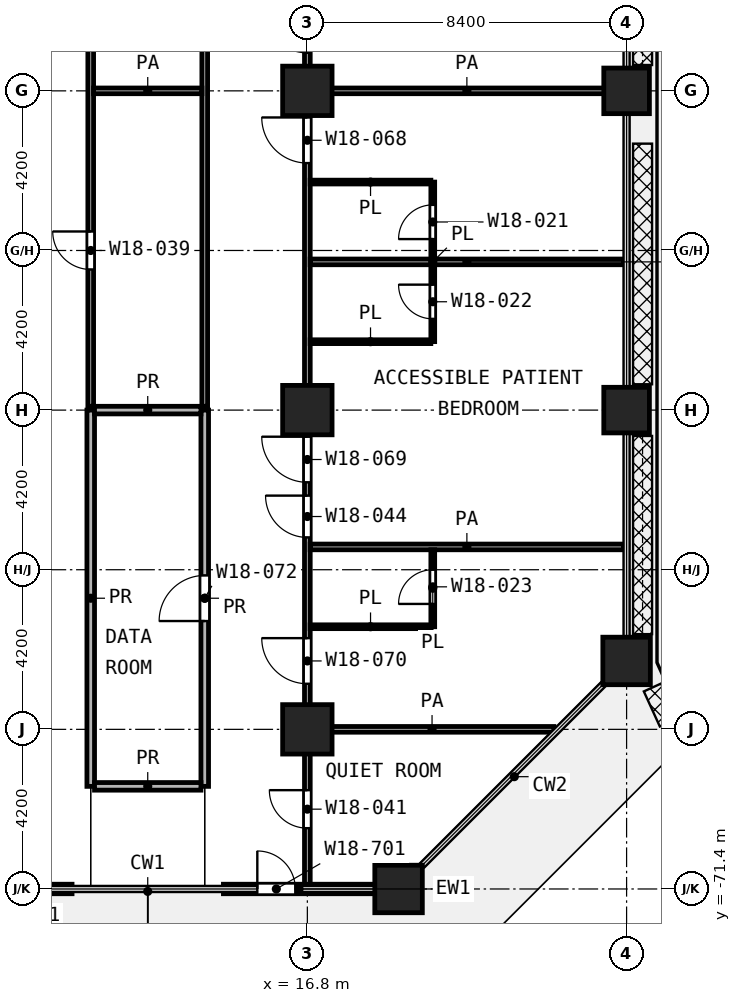
"""IFC4 building model, lengths in metres.
Left out: names, types, materials, properties, quantities, classifications, styles, units other than length and angle.
Written with IfcOpenShell. Run it as: python <this file> out.ifc"""

import sys

from ifc_helpers import new_model, si_unit, direction, frame, frame_2d, origin, origin_2d, place, context, subcontext, project, spatial, rectangle, extrude, element, fill, save


model = new_model("IFC4")
c1 = context("Model", 3, precision=1e-05, world=origin(), true_north=direction((0.0, 1.0)))
c2 = subcontext(c1, "Body", "Model", "MODEL_VIEW")
j1 = project(units=[si_unit("LENGTHUNIT", "METRE"), si_unit("PLANEANGLEUNIT", "RADIAN")], contexts=[c1])
p1 = place(None, origin())
s1 = spatial("IfcSite", under=j1, at=p1, CompositionType="ELEMENT")
p2 = place(p1, origin())
s2 = spatial("IfcBuilding", under=s1, at=p2, CompositionType="ELEMENT")
p3 = place(p2, frame((0.0, 0.0, 81.2)))
s3 = spatial("IfcBuildingStorey", under=s2, at=p3, CompositionType="ELEMENT", Elevation=81.2)
p4 = place(p3, frame((16.8, -50.4, 0.0), z_axis=(0.0, 0.0, 1.0), x_axis=(1.0, 0.0, 0.0)))
e1 = element("IfcColumn", 1, at=p4, inside=s3, PredefinedType="COLUMN", context=c2, shape_type="SweptSolid", body=[
    extrude(rectangle(XDim=1.3, YDim=1.3, at=origin_2d()), origin(), (0.0, 0.0, 1.0), 4.2),
])
p5 = place(p3, frame((25.2, -50.4, 0.0), z_axis=(0.0, 0.0, 1.0), x_axis=(1.0, 0.0, 0.0)))
e2 = element("IfcColumn", 2, at=p5, inside=s3, PredefinedType="COLUMN", context=c2, shape_type="SweptSolid", body=[
    extrude(rectangle(XDim=1.2, YDim=1.2, at=origin_2d()), origin(), (0.0, 0.0, 1.0), 4.2),
])
p6 = place(p3, frame((16.8, -58.8, 0.0), z_axis=(0.0, 0.0, 1.0), x_axis=(1.0, 0.0, 0.0)))
e3 = element("IfcColumn", 3, at=p6, inside=s3, PredefinedType="COLUMN", context=c2, shape_type="SweptSolid", body=[
    extrude(rectangle(XDim=1.3, YDim=1.3, at=origin_2d()), origin(), (0.0, 0.0, 1.0), 4.2),
])
p7 = place(p3, frame((25.2, -58.8, 0.0), z_axis=(0.0, 0.0, 1.0), x_axis=(1.0, 0.0, 0.0)))
e4 = element("IfcColumn", 4, at=p7, inside=s3, PredefinedType="COLUMN", context=c2, shape_type="SweptSolid", body=[
    extrude(rectangle(XDim=1.2, YDim=1.2, at=origin_2d()), origin(), (0.0, 0.0, 1.0), 4.2),
])
p8 = place(p3, frame((25.2, -65.4, 0.0), z_axis=(0.0, 0.0, 1.0), x_axis=(1.0, 0.0, 0.0)))
e5 = element("IfcColumn", 5, at=p8, inside=s3, PredefinedType="COLUMN", context=c2, shape_type="SweptSolid", body=[
    extrude(rectangle(XDim=1.25, YDim=1.25, at=origin_2d()), origin(), (0.0, 0.0, 1.0), 4.2),
])
p9 = place(p3, frame((16.8, -67.2, 0.0), z_axis=(0.0, 0.0, 1.0), x_axis=(1.0, 0.0, 0.0)))
e6 = element("IfcColumn", 6, at=p9, inside=s3, PredefinedType="COLUMN", context=c2, shape_type="SweptSolid", body=[
    extrude(rectangle(XDim=1.3, YDim=1.3, at=origin_2d()), origin(), (0.0, 0.0, 1.0), 4.2),
])
p10 = place(p3, frame((19.2, -71.4, 0.0), z_axis=(0.0, 0.0, 1.0), x_axis=(1.0, 0.0, 0.0)))
e7 = element("IfcColumn", 7, at=p10, inside=s3, PredefinedType="COLUMN", context=c2, shape_type="SweptSolid", body=[
    extrude(rectangle(XDim=1.25, YDim=1.25, at=origin_2d()), origin(), (0.0, 0.0, 1.0), 4.2),
])
p11 = place(p3, frame((6.625, -71.4, 0.0), z_axis=(0.0, 0.0, 1.0), x_axis=(1.0, 0.0, 0.0)))
e8 = element("IfcWall", 8, at=p11, inside=s3, PredefinedType="SOLIDWALL", context=c2, shape_type="SweptSolid", body=[
    extrude(rectangle(XDim=3.983, YDim=0.25, at=frame_2d((1.992, 0.0))), origin(), (0.0, 0.0, 1.0), 3.78),
])
p12 = place(p11, frame((2.092, 0.0, 0.0)))
e9 = element("IfcOpeningElement", 9, at=p12, cuts=e8, PredefinedType="OPENING", context=c2, shape_type="SweptSolid", body=[
    extrude(rectangle(XDim=1.0, YDim=2.1, at=frame_2d((0.5, 1.05))), frame((0.0, 0.135, 0.0), z_axis=(0.0, -1.0, 0.0), x_axis=(1.0, 0.0, 0.0)), (0.0, 0.0, 1.0), 0.27),
])
p13 = place(p3, frame((14.592, -71.4, 0.0), z_axis=(0.0, 0.0, 1.0), x_axis=(1.0, 0.0, 0.0)))
e10 = element("IfcWall", 10, at=p13, inside=s3, PredefinedType="SOLIDWALL", context=c2, shape_type="SweptSolid", body=[
    extrude(rectangle(XDim=3.983, YDim=0.25, at=frame_2d((1.992, 0.0))), origin(), (0.0, 0.0, 1.0), 3.78),
])
p14 = place(p13, frame((0.892, 0.0, 0.0)))
e11 = element("IfcOpeningElement", 11, at=p14, cuts=e10, PredefinedType="OPENING", context=c2, shape_type="SweptSolid", body=[
    extrude(rectangle(XDim=1.0, YDim=2.1, at=frame_2d((0.5, 1.05))), frame((0.0, 0.135, 0.0), z_axis=(0.0, -1.0, 0.0), x_axis=(1.0, 0.0, 0.0)), (0.0, 0.0, 1.0), 0.27),
])
p15 = place(p3, frame((16.875, -64.5, 0.0), z_axis=(0.0, 0.0, 1.0), x_axis=(1.0, 0.0, 0.0)))
e12 = element("IfcWall", 12, at=p15, inside=s3, PredefinedType="PARTITIONING", context=c2, shape_type="SweptSolid", body=[
    extrude(rectangle(XDim=3.175, YDim=0.1, at=frame_2d((1.587, 0.0))), origin(), (0.0, 0.0, 1.0), 3.9),
])
p16 = place(p3, frame((16.875, -57.0, 0.0), z_axis=(0.0, 0.0, 1.0), x_axis=(1.0, 0.0, 0.0)))
e13 = element("IfcWall", 13, at=p16, inside=s3, PredefinedType="PARTITIONING", context=c2, shape_type="SweptSolid", body=[
    extrude(rectangle(XDim=3.174, YDim=0.1, at=frame_2d((1.587, 0.0))), origin(), (0.0, 0.0, 1.0), 3.9),
])
p17 = place(p3, frame((16.875, -52.8, 0.0), z_axis=(0.0, 0.0, 1.0), x_axis=(1.0, 0.0, 0.0)))
e14 = element("IfcWall", 14, at=p17, inside=s3, PredefinedType="PARTITIONING", context=c2, shape_type="SweptSolid", body=[
    extrude(rectangle(XDim=3.175, YDim=0.1, at=frame_2d((1.587, 0.0))), origin(), (0.0, 0.0, 1.0), 3.9),
])
p18 = place(p3, frame((20.1, -64.5, 0.0), z_axis=(0.0, 0.0, 1.0), x_axis=(0.0, 1.0, 0.0)))
e15 = element("IfcWall", 15, at=p18, inside=s3, PredefinedType="PARTITIONING", context=c2, shape_type="SweptSolid", body=[
    extrude(rectangle(XDim=2.025, YDim=0.1, at=frame_2d((1.012, 0.0))), origin(), (0.0, 0.0, 1.0), 3.9),
])
p19 = place(p18, frame((0.6, 0.0, 0.0)))
e16 = element("IfcOpeningElement", 16, at=p19, cuts=e15, PredefinedType="OPENING", context=c2, shape_type="SweptSolid", body=[
    extrude(rectangle(XDim=0.9, YDim=2.1, at=frame_2d((0.45, 1.05))), frame((0.0, 0.06, 0.0), z_axis=(0.0, -1.0, 0.0), x_axis=(1.0, 0.0, 0.0)), (0.0, 0.0, 1.0), 0.12),
])
p20 = place(p3, frame((20.1, -56.998, 0.0), z_axis=(0.0, 0.0, 1.0), x_axis=(0.0, 1.0, 0.0)))
e17 = element("IfcWall", 17, at=p20, inside=s3, PredefinedType="PARTITIONING", context=c2, shape_type="SweptSolid", body=[
    extrude(rectangle(XDim=4.198, YDim=0.1, at=frame_2d((2.099, 0.0))), origin(), (0.0, 0.0, 1.0), 3.9),
])
p21 = place(p20, frame((2.698, 0.0, 0.0)))
e18 = element("IfcOpeningElement", 18, at=p21, cuts=e17, PredefinedType="OPENING", context=c2, shape_type="SweptSolid", body=[
    extrude(rectangle(XDim=0.9, YDim=2.1, at=frame_2d((0.45, 1.05))), frame((0.0, 0.06, 0.0), z_axis=(0.0, -1.0, 0.0), x_axis=(1.0, 0.0, 0.0)), (0.0, 0.0, 1.0), 0.12),
])
p22 = place(p20, frame((0.599, 0.0, 0.0)))
e19 = element("IfcOpeningElement", 19, at=p22, cuts=e17, PredefinedType="OPENING", context=c2, shape_type="SweptSolid", body=[
    extrude(rectangle(XDim=0.9, YDim=2.1, at=frame_2d((0.45, 1.05))), frame((0.0, 0.06, 0.0), z_axis=(0.0, -1.0, 0.0), x_axis=(1.0, 0.0, 0.0)), (0.0, 0.0, 1.0), 0.12),
])
p23 = place(p3, frame((16.875, -67.2, 0.0), z_axis=(0.0, 0.0, 1.0), x_axis=(1.0, 0.0, 0.0)))
e20 = element("IfcWall", 20, at=p23, inside=s3, PredefinedType="PARTITIONING", context=c2, shape_type="SweptSolid", body=[
    extrude(rectangle(XDim=6.412, YDim=0.15, at=frame_2d((3.206, 0.0))), origin(), (0.0, 0.0, 1.0), 3.9),
])
for number, where, z_axis, x_axis in (
    (21, (16.875, -62.4, 0.0), (0.0, 0.0, 1.0), (1.0, 0.0, 0.0)),
    (22, (16.875, -54.9, 0.0), (0.0, 0.0, 1.0), (1.0, 0.0, 0.0)),
):
    element("IfcWall", number, at=place(p3, frame(where, z_axis=z_axis, x_axis=x_axis)), inside=s3, PredefinedType="PARTITIONING", context=c2, shape_type="SweptSolid", body=[
        extrude(rectangle(XDim=8.245, YDim=0.15, at=frame_2d((4.123, 0.0))), origin(), (0.0, 0.0, 1.0), 3.9),
    ])
p24 = place(p3, frame((11.175, -50.4, 0.0), z_axis=(0.0, 0.0, 1.0), x_axis=(1.0, 0.0, 0.0)))
e23 = element("IfcWall", 23, at=p24, inside=s3, PredefinedType="PARTITIONING", context=c2, shape_type="SweptSolid", body=[
    extrude(rectangle(XDim=2.85, YDim=0.15, at=frame_2d((1.425, 0.0))), origin(), (0.0, 0.0, 1.0), 3.9),
])
p25 = place(p3, frame((16.875, -50.4, 0.0), z_axis=(0.0, 0.0, 1.0), x_axis=(1.0, 0.0, 0.0)))
e24 = element("IfcWall", 24, at=p25, inside=s3, PredefinedType="PARTITIONING", context=c2, shape_type="SweptSolid", body=[
    extrude(rectangle(XDim=8.245, YDim=0.15, at=frame_2d((4.123, 0.0))), origin(), (0.0, 0.0, 1.0), 3.9),
])
p26 = place(p3, frame((11.1, -58.7, 0.0), z_axis=(0.0, 0.0, 1.0), x_axis=(0.0, 1.0, 0.0)))
e25 = element("IfcWall", 25, at=p26, inside=s3, PredefinedType="PARTITIONING", context=c2, shape_type="SweptSolid", body=[
    extrude(rectangle(XDim=25.0, YDim=0.15, at=frame_2d((12.5, 0.0))), origin(), (0.0, 0.0, 1.0), 3.9),
])
p27 = place(p26, frame((14.3, 0.0, 0.0)))
e26 = element("IfcOpeningElement", 26, at=p27, cuts=e25, PredefinedType="OPENING", context=c2, shape_type="SweptSolid", body=[
    extrude(rectangle(XDim=1.2, YDim=2.1, at=frame_2d((0.6, 1.05))), frame((0.0, 0.085, 0.0), z_axis=(0.0, -1.0, 0.0), x_axis=(1.0, 0.0, 0.0)), (0.0, 0.0, 1.0), 0.17),
])
p28 = place(p26, frame((3.6, 0.0, 0.0)))
e27 = element("IfcOpeningElement", 27, at=p28, cuts=e25, PredefinedType="OPENING", context=c2, shape_type="SweptSolid", body=[
    extrude(rectangle(XDim=1.0, YDim=2.1, at=frame_2d((0.5, 1.05))), frame((0.0, 0.085, 0.0), z_axis=(0.0, -1.0, 0.0), x_axis=(1.0, 0.0, 0.0)), (0.0, 0.0, 1.0), 0.17),
])
p29 = place(p3, frame((14.1, -58.7, 0.0), z_axis=(0.0, 0.0, 1.0), x_axis=(0.0, 1.0, 0.0)))
e28 = element("IfcWall", 28, at=p29, inside=s3, PredefinedType="PARTITIONING", context=c2, shape_type="SweptSolid", body=[
    extrude(rectangle(XDim=25.0, YDim=0.15, at=frame_2d((12.5, 0.0))), origin(), (0.0, 0.0, 1.0), 3.9),
])
p30 = place(p29, frame((22.8, 0.0, 0.0)))
e29 = element("IfcOpeningElement", 29, at=p30, cuts=e28, PredefinedType="OPENING", context=c2, shape_type="SweptSolid", body=[
    extrude(rectangle(XDim=1.0, YDim=2.1, at=frame_2d((0.5, 1.05))), frame((0.0, 0.085, 0.0), z_axis=(0.0, -1.0, 0.0), x_axis=(1.0, 0.0, 0.0)), (0.0, 0.0, 1.0), 0.17),
])
p31 = place(p3, frame((16.8, -71.32, 0.0), z_axis=(0.0, 0.0, 1.0), x_axis=(0.0, 1.0, 0.0)))
e30 = element("IfcWall", 30, at=p31, inside=s3, PredefinedType="PARTITIONING", context=c2, shape_type="SweptSolid", body=[
    extrude(rectangle(XDim=46.22, YDim=0.15, at=frame_2d((23.11, 0.0))), origin(), (0.0, 0.0, 1.0), 3.9),
])
p32 = place(p31, frame((39.32, 0.0, 0.0)))
e31 = element("IfcOpeningElement", 31, at=p32, cuts=e30, PredefinedType="OPENING", context=c2, shape_type="SweptSolid", body=[
    extrude(rectangle(XDim=1.0, YDim=2.1, at=frame_2d((0.5, 1.05))), frame((0.0, 0.085, 0.0), z_axis=(0.0, -1.0, 0.0), x_axis=(1.0, 0.0, 0.0)), (0.0, 0.0, 1.0), 0.17),
])
p33 = place(p31, frame((35.82, 0.0, 0.0)))
e32 = element("IfcOpeningElement", 32, at=p33, cuts=e30, PredefinedType="OPENING", context=c2, shape_type="SweptSolid", body=[
    extrude(rectangle(XDim=1.2, YDim=2.1, at=frame_2d((0.6, 1.05))), frame((0.0, 0.085, 0.0), z_axis=(0.0, -1.0, 0.0), x_axis=(1.0, 0.0, 0.0)), (0.0, 0.0, 1.0), 0.17),
])
p34 = place(p31, frame((30.52, 0.0, 0.0)))
e33 = element("IfcOpeningElement", 33, at=p34, cuts=e30, PredefinedType="OPENING", context=c2, shape_type="SweptSolid", body=[
    extrude(rectangle(XDim=1.2, YDim=2.1, at=frame_2d((0.6, 1.05))), frame((0.0, 0.085, 0.0), z_axis=(0.0, -1.0, 0.0), x_axis=(1.0, 0.0, 0.0)), (0.0, 0.0, 1.0), 0.17),
])
p35 = place(p31, frame((27.72, 0.0, 0.0)))
e34 = element("IfcOpeningElement", 34, at=p35, cuts=e30, PredefinedType="OPENING", context=c2, shape_type="SweptSolid", body=[
    extrude(rectangle(XDim=0.9, YDim=2.1, at=frame_2d((0.45, 1.05))), frame((0.0, 0.085, 0.0), z_axis=(0.0, -1.0, 0.0), x_axis=(1.0, 0.0, 0.0)), (0.0, 0.0, 1.0), 0.17),
])
p36 = place(p31, frame((21.92, 0.0, 0.0)))
e35 = element("IfcOpeningElement", 35, at=p36, cuts=e30, PredefinedType="OPENING", context=c2, shape_type="SweptSolid", body=[
    extrude(rectangle(XDim=1.2, YDim=2.1, at=frame_2d((0.6, 1.05))), frame((0.0, 0.085, 0.0), z_axis=(0.0, -1.0, 0.0), x_axis=(1.0, 0.0, 0.0)), (0.0, 0.0, 1.0), 0.17),
])
p37 = place(p31, frame((19.02, 0.0, 0.0)))
e36 = element("IfcOpeningElement", 36, at=p37, cuts=e30, PredefinedType="OPENING", context=c2, shape_type="SweptSolid", body=[
    extrude(rectangle(XDim=1.2, YDim=2.1, at=frame_2d((0.6, 1.05))), frame((0.0, 0.085, 0.0), z_axis=(0.0, -1.0, 0.0), x_axis=(1.0, 0.0, 0.0)), (0.0, 0.0, 1.0), 0.17),
])
p38 = place(p31, frame((10.62, 0.0, 0.0)))
e37 = element("IfcOpeningElement", 37, at=p38, cuts=e30, PredefinedType="OPENING", context=c2, shape_type="SweptSolid", body=[
    extrude(rectangle(XDim=1.2, YDim=2.1, at=frame_2d((0.6, 1.05))), frame((0.0, 0.085, 0.0), z_axis=(0.0, -1.0, 0.0), x_axis=(1.0, 0.0, 0.0)), (0.0, 0.0, 1.0), 0.17),
])
p39 = place(p31, frame((9.17, 0.0, 0.0)))
e38 = element("IfcOpeningElement", 38, at=p39, cuts=e30, PredefinedType="OPENING", context=c2, shape_type="SweptSolid", body=[
    extrude(rectangle(XDim=1.1, YDim=2.1, at=frame_2d((0.55, 1.05))), frame((0.0, 0.085, 0.0), z_axis=(0.0, -1.0, 0.0), x_axis=(1.0, 0.0, 0.0)), (0.0, 0.0, 1.0), 0.17),
])
p40 = place(p31, frame((5.32, 0.0, 0.0)))
e39 = element("IfcOpeningElement", 39, at=p40, cuts=e30, PredefinedType="OPENING", context=c2, shape_type="SweptSolid", body=[
    extrude(rectangle(XDim=1.2, YDim=2.1, at=frame_2d((0.6, 1.05))), frame((0.0, 0.085, 0.0), z_axis=(0.0, -1.0, 0.0), x_axis=(1.0, 0.0, 0.0)), (0.0, 0.0, 1.0), 0.17),
])
p41 = place(p31, frame((1.52, 0.0, 0.0)))
e40 = element("IfcOpeningElement", 40, at=p41, cuts=e30, PredefinedType="OPENING", context=c2, shape_type="SweptSolid", body=[
    extrude(rectangle(XDim=1.0, YDim=2.1, at=frame_2d((0.5, 1.05))), frame((0.0, 0.085, 0.0), z_axis=(0.0, -1.0, 0.0), x_axis=(1.0, 0.0, 0.0)), (0.0, 0.0, 1.0), 0.17),
])
for number, where, z_axis, x_axis in (
    (41, (11.2, -68.7, 0.0), (0.0, 0.0, 1.0), (1.0, 0.0, 0.0)),
    (42, (11.2, -58.8, 0.0), (0.0, 0.0, 1.0), (1.0, 0.0, 0.0)),
):
    element("IfcWall", number, at=place(p3, frame(where, z_axis=z_axis, x_axis=x_axis)), inside=s3, PredefinedType="PARTITIONING", context=c2, shape_type="SweptSolid", body=[
        extrude(rectangle(XDim=2.8, YDim=0.2, at=frame_2d((1.4, 0.0))), origin(), (0.0, 0.0, 1.0), 3.9),
    ])
p42 = place(p3, frame((11.1, -68.7, 0.0), z_axis=(0.0, 0.0, 1.0), x_axis=(0.0, 1.0, 0.0)))
e43 = element("IfcWall", 43, at=p42, inside=s3, PredefinedType="PARTITIONING", context=c2, shape_type="SweptSolid", body=[
    extrude(rectangle(XDim=9.9, YDim=0.2, at=frame_2d((4.95, 0.0))), origin(), (0.0, 0.0, 1.0), 3.9),
])
p43 = place(p3, frame((14.1, -68.7, 0.0), z_axis=(0.0, 0.0, 1.0), x_axis=(0.0, 1.0, 0.0)))
e44 = element("IfcWall", 44, at=p43, inside=s3, PredefinedType="PARTITIONING", context=c2, shape_type="SweptSolid", body=[
    extrude(rectangle(XDim=9.9, YDim=0.2, at=frame_2d((4.95, 0.0))), origin(), (0.0, 0.0, 1.0), 3.9),
])
p44 = place(p43, frame((4.35, 0.0, 0.0)))
e45 = element("IfcOpeningElement", 45, at=p44, cuts=e44, PredefinedType="OPENING", context=c2, shape_type="SweptSolid", body=[
    extrude(rectangle(XDim=1.2, YDim=2.1, at=frame_2d((0.6, 1.05))), frame((0.0, 0.11, 0.0), z_axis=(0.0, -1.0, 0.0), x_axis=(1.0, 0.0, 0.0)), (0.0, 0.0, 1.0), 0.22),
])
p45 = place(p14, origin())
e46 = element("IfcDoor", 46, at=p45, inside=s3, OperationType="SINGLE_SWING_LEFT", PredefinedType="DOOR", context=c2, shape_type="SweptSolid", body=[
    extrude(rectangle(XDim=1.0, YDim=2.1, at=frame_2d((0.5, 1.05))), frame((0.0, 0.025, 0.0), z_axis=(0.0, -1.0, 0.0), x_axis=(1.0, 0.0, 0.0)), (0.0, 0.0, 1.0), 0.05),
])
fill(e11, e46)
p46 = place(p28, origin())
e47 = element("IfcDoor", 47, at=p46, inside=s3, OperationType="SINGLE_SWING_RIGHT", PredefinedType="DOOR", context=c2, shape_type="SweptSolid", body=[
    extrude(rectangle(XDim=1.0, YDim=2.1, at=frame_2d((0.5, 1.05))), frame((0.0, 0.025, 0.0), z_axis=(0.0, -1.0, 0.0), x_axis=(1.0, 0.0, 0.0)), (0.0, 0.0, 1.0), 0.05),
])
fill(e27, e47)
p47 = place(p44, origin())
e48 = element("IfcDoor", 48, at=p47, inside=s3, OperationType="SINGLE_SWING_LEFT", PredefinedType="DOOR", context=c2, shape_type="SweptSolid", body=[
    extrude(rectangle(XDim=1.2, YDim=2.1, at=frame_2d((0.6, 1.05))), frame((0.0, 0.025, 0.0), z_axis=(0.0, -1.0, 0.0), x_axis=(1.0, 0.0, 0.0)), (0.0, 0.0, 1.0), 0.05),
])
fill(e45, e48)
p48 = place(p36, origin())
e49 = element("IfcDoor", 49, at=p48, inside=s3, OperationType="SINGLE_SWING_RIGHT", PredefinedType="DOOR", context=c2, shape_type="SweptSolid", body=[
    extrude(rectangle(XDim=1.2, YDim=2.1, at=frame_2d((0.6, 1.05))), frame((0.0, 0.025, 0.0), z_axis=(0.0, -1.0, 0.0), x_axis=(1.0, 0.0, 0.0)), (0.0, 0.0, 1.0), 0.05),
])
fill(e35, e49)
p49 = place(p37, origin())
e50 = element("IfcDoor", 50, at=p49, inside=s3, OperationType="SINGLE_SWING_RIGHT", PredefinedType="DOOR", context=c2, shape_type="SweptSolid", body=[
    extrude(rectangle(XDim=1.2, YDim=2.1, at=frame_2d((0.6, 1.05))), frame((0.0, 0.025, 0.0), z_axis=(0.0, -1.0, 0.0), x_axis=(1.0, 0.0, 0.0)), (0.0, 0.0, 1.0), 0.05),
])
fill(e36, e50)
p50 = place(p21, origin())
e51 = element("IfcDoor", 51, at=p50, inside=s3, OperationType="SINGLE_SWING_LEFT", PredefinedType="DOOR", context=c2, shape_type="SweptSolid", body=[
    extrude(rectangle(XDim=0.9, YDim=2.1, at=frame_2d((0.45, 1.05))), frame((0.0, 0.025, 0.0), z_axis=(0.0, -1.0, 0.0), x_axis=(1.0, 0.0, 0.0)), (0.0, 0.0, 1.0), 0.05),
])
fill(e18, e51)
p51 = place(p38, origin())
e52 = element("IfcDoor", 52, at=p51, inside=s3, OperationType="SINGLE_SWING_RIGHT", PredefinedType="DOOR", context=c2, shape_type="SweptSolid", body=[
    extrude(rectangle(XDim=1.2, YDim=2.1, at=frame_2d((0.6, 1.05))), frame((0.0, 0.025, 0.0), z_axis=(0.0, -1.0, 0.0), x_axis=(1.0, 0.0, 0.0)), (0.0, 0.0, 1.0), 0.05),
])
fill(e37, e52)
p52 = place(p39, origin())
e53 = element("IfcDoor", 53, at=p52, inside=s3, OperationType="SINGLE_SWING_RIGHT", PredefinedType="DOOR", context=c2, shape_type="SweptSolid", body=[
    extrude(rectangle(XDim=1.1, YDim=2.1, at=frame_2d((0.55, 1.05))), frame((0.0, 0.025, 0.0), z_axis=(0.0, -1.0, 0.0), x_axis=(1.0, 0.0, 0.0)), (0.0, 0.0, 1.0), 0.05),
])
fill(e38, e53)
p53 = place(p22, origin())
e54 = element("IfcDoor", 54, at=p53, inside=s3, OperationType="SINGLE_SWING_RIGHT", PredefinedType="DOOR", context=c2, shape_type="SweptSolid", body=[
    extrude(rectangle(XDim=0.9, YDim=2.1, at=frame_2d((0.45, 1.05))), frame((0.0, 0.025, 0.0), z_axis=(0.0, -1.0, 0.0), x_axis=(1.0, 0.0, 0.0)), (0.0, 0.0, 1.0), 0.05),
])
fill(e19, e54)
p54 = place(p40, origin())
e55 = element("IfcDoor", 55, at=p54, inside=s3, OperationType="SINGLE_SWING_RIGHT", PredefinedType="DOOR", context=c2, shape_type="SweptSolid", body=[
    extrude(rectangle(XDim=1.2, YDim=2.1, at=frame_2d((0.6, 1.05))), frame((0.0, 0.025, 0.0), z_axis=(0.0, -1.0, 0.0), x_axis=(1.0, 0.0, 0.0)), (0.0, 0.0, 1.0), 0.05),
])
fill(e39, e55)
p55 = place(p19, origin())
e56 = element("IfcDoor", 56, at=p55, inside=s3, OperationType="SINGLE_SWING_LEFT", PredefinedType="DOOR", context=c2, shape_type="SweptSolid", body=[
    extrude(rectangle(XDim=0.9, YDim=2.1, at=frame_2d((0.45, 1.05))), frame((0.0, 0.025, 0.0), z_axis=(0.0, -1.0, 0.0), x_axis=(1.0, 0.0, 0.0)), (0.0, 0.0, 1.0), 0.05),
])
fill(e16, e56)
p56 = place(p41, origin())
e57 = element("IfcDoor", 57, at=p56, inside=s3, OperationType="SINGLE_SWING_RIGHT", PredefinedType="DOOR", context=c2, shape_type="SweptSolid", body=[
    extrude(rectangle(XDim=1.0, YDim=2.1, at=frame_2d((0.5, 1.05))), frame((0.0, 0.025, 0.0), z_axis=(0.0, -1.0, 0.0), x_axis=(1.0, 0.0, 0.0)), (0.0, 0.0, 1.0), 0.05),
])
fill(e40, e57)
save(model, sys.argv[1])
